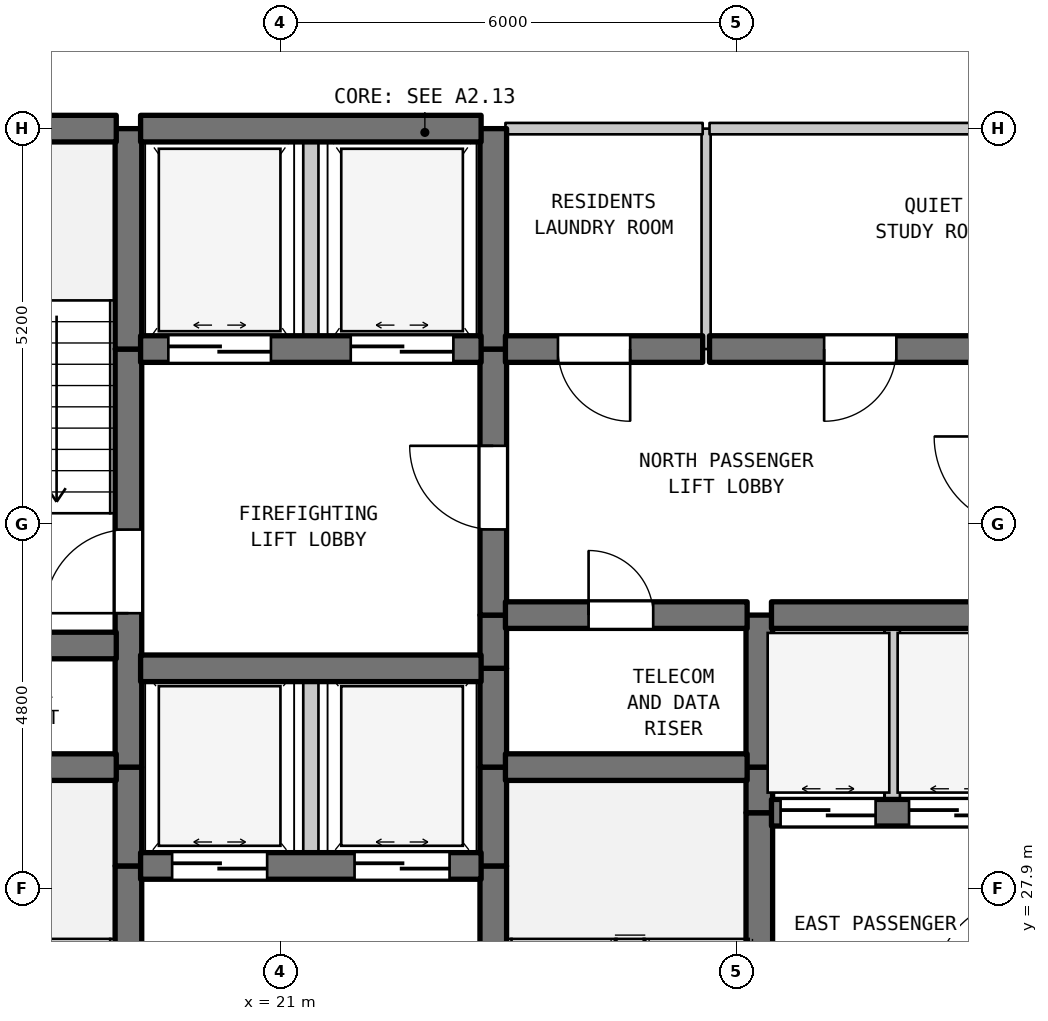
"""IFC4 building model, lengths in metres.
Left out: names, types, materials, properties, quantities, classifications, styles, units other than length and angle.
Written with IfcOpenShell. Run it as: python <this file> out.ifc"""

import sys

from ifc_helpers import new_model, si_unit, direction, frame, frame_2d, origin, place, context, subcontext, project, spatial, rectangle, extrude, element, fill, save


model = new_model("IFC4")
c1 = context("Model", 3, precision=1e-05, world=origin(), true_north=direction((0.0, 1.0)))
c2 = subcontext(c1, "Body", "Model", "MODEL_VIEW")
j1 = project(units=[si_unit("LENGTHUNIT", "METRE"), si_unit("PLANEANGLEUNIT", "RADIAN")], contexts=[c1])
p1 = place(None, origin())
s1 = spatial("IfcSite", under=j1, at=p1, CompositionType="ELEMENT")
p2 = place(p1, origin())
s2 = spatial("IfcBuilding", under=s1, at=p2, CompositionType="ELEMENT")
p3 = place(p2, frame((0.0, 0.0, 129.8)))
s3 = spatial("IfcBuildingStorey", under=s2, at=p3, CompositionType="ELEMENT", Elevation=129.8)
p4 = place(p3, frame((19.0, 22.7, 0.0), z_axis=(0.0, 0.0, 1.0), x_axis=(0.0, 1.0, 0.0)))
e1 = element("IfcWall", 1, at=p4, inside=s3, PredefinedType="SHEAR", context=c2, shape_type="SweptSolid", body=[
    extrude(rectangle(XDim=5.5, YDim=0.35, at=frame_2d((2.75, 0.0))), origin(), (0.0, 0.0, 1.0), 3.385),
])
p5 = place(p4, frame((0.631, 0.0, 0.0)))
e2 = element("IfcOpeningElement", 2, at=p5, cuts=e1, PredefinedType="OPENING", context=c2, shape_type="SweptSolid", body=[
    extrude(rectangle(XDim=1.1, YDim=2.15, at=frame_2d((0.55, 1.075))), frame((0.0, 0.185, 0.0), z_axis=(0.0, -1.0, 0.0), x_axis=(1.0, 0.0, 0.0)), (0.0, 0.0, 1.0), 0.37),
])
p6 = place(p3, frame((19.0, 28.2, 0.0), z_axis=(0.0, 0.0, 1.0), x_axis=(0.0, 1.0, 0.0)))
e3 = element("IfcWall", 3, at=p6, inside=s3, PredefinedType="SHEAR", context=c2, shape_type="SweptSolid", body=[
    extrude(rectangle(XDim=1.3, YDim=0.35, at=frame_2d((0.65, 0.0))), origin(), (0.0, 0.0, 1.0), 3.385),
])
p7 = place(p3, frame((19.0, 29.5, 0.0), z_axis=(0.0, 0.0, 1.0), x_axis=(0.0, 1.0, 0.0)))
e4 = element("IfcWall", 4, at=p7, inside=s3, PredefinedType="SHEAR", context=c2, shape_type="SweptSolid", body=[
    extrude(rectangle(XDim=5.5, YDim=0.35, at=frame_2d((2.75, 0.0))), origin(), (0.0, 0.0, 1.0), 3.385),
])
p8 = place(p7, frame((2.025, 0.0, 0.0)))
e5 = element("IfcOpeningElement", 5, at=p8, cuts=e4, PredefinedType="OPENING", context=c2, shape_type="SweptSolid", body=[
    extrude(rectangle(XDim=1.1, YDim=2.15, at=frame_2d((0.55, 1.075))), frame((0.0, 0.185, 0.0), z_axis=(0.0, -1.0, 0.0), x_axis=(1.0, 0.0, 0.0)), (0.0, 0.0, 1.0), 0.37),
])
p9 = place(p3, frame((19.0, 35.0, 0.0), z_axis=(0.0, 0.0, 1.0), x_axis=(0.0, 1.0, 0.0)))
e6 = element("IfcWall", 6, at=p9, inside=s3, PredefinedType="SHEAR", context=c2, shape_type="SweptSolid", body=[
    extrude(rectangle(XDim=2.9, YDim=0.35, at=frame_2d((1.45, 0.0))), origin(), (0.0, 0.0, 1.0), 3.385),
])
p10 = place(p3, frame((21.4, 28.2, 0.0), z_axis=(0.0, 0.0, 1.0), x_axis=(0.0, 1.0, 0.0)))
e7 = element("IfcWall", 7, at=p10, inside=s3, PredefinedType="STANDARD", context=c2, shape_type="SweptSolid", body=[
    extrude(rectangle(XDim=2.6, YDim=0.2, at=frame_2d((1.3, 0.0))), origin(), (0.0, 0.0, 1.0), 3.385),
])
p11 = place(p3, frame((21.4, 35.0, 0.0), z_axis=(0.0, 0.0, 1.0), x_axis=(0.0, 1.0, 0.0)))
e8 = element("IfcWall", 8, at=p11, inside=s3, PredefinedType="STANDARD", context=c2, shape_type="SweptSolid", body=[
    extrude(rectangle(XDim=2.9, YDim=0.2, at=frame_2d((1.45, 0.0))), origin(), (0.0, 0.0, 1.0), 3.385),
])
p12 = place(p3, frame((23.8, 22.7, 0.0), z_axis=(0.0, 0.0, 1.0), x_axis=(0.0, 1.0, 0.0)))
e9 = element("IfcWall", 9, at=p12, inside=s3, PredefinedType="SHEAR", context=c2, shape_type="SweptSolid", body=[
    extrude(rectangle(XDim=5.5, YDim=0.35, at=frame_2d((2.75, 0.0))), origin(), (0.0, 0.0, 1.0), 3.385),
])
p13 = place(p12, frame((0.235, 0.0, 0.0)))
e10 = element("IfcOpeningElement", 10, at=p13, cuts=e9, PredefinedType="OPENING", context=c2, shape_type="SweptSolid", body=[
    extrude(rectangle(XDim=1.1, YDim=2.15, at=frame_2d((0.55, 1.075))), frame((0.0, 0.185, 0.0), z_axis=(0.0, -1.0, 0.0), x_axis=(1.0, 0.0, 0.0)), (0.0, 0.0, 1.0), 0.37),
])
for number, where, z_axis, x_axis in (
    (11, (23.8, 28.2, 0.0), (0.0, 0.0, 1.0), (0.0, 1.0, 0.0)),
    (12, (23.8, 29.5, 0.0), (0.0, 0.0, 1.0), (0.0, 1.0, 0.0)),
):
    element("IfcWall", number, at=place(p3, frame(where, z_axis=z_axis, x_axis=x_axis)), inside=s3, PredefinedType="SHEAR", context=c2, shape_type="SweptSolid", body=[
        extrude(rectangle(XDim=1.3, YDim=0.35, at=frame_2d((0.65, 0.0))), origin(), (0.0, 0.0, 1.0), 3.385),
    ])
p14 = place(p3, frame((23.8, 30.8, 0.0), z_axis=(0.0, 0.0, 1.0), x_axis=(0.0, 1.0, 0.0)))
e13 = element("IfcWall", 13, at=p14, inside=s3, PredefinedType="SHEAR", context=c2, shape_type="SweptSolid", body=[
    extrude(rectangle(XDim=0.7, YDim=0.35, at=frame_2d((0.35, 0.0))), origin(), (0.0, 0.0, 1.0), 3.385),
])
p15 = place(p3, frame((23.8, 31.5, 0.0), z_axis=(0.0, 0.0, 1.0), x_axis=(0.0, 1.0, 0.0)))
e14 = element("IfcWall", 14, at=p15, inside=s3, PredefinedType="SHEAR", context=c2, shape_type="SweptSolid", body=[
    extrude(rectangle(XDim=3.5, YDim=0.35, at=frame_2d((1.75, 0.0))), origin(), (0.0, 0.0, 1.0), 3.385),
])
p16 = place(p15, frame((1.127, 0.0, 0.0)))
e15 = element("IfcOpeningElement", 15, at=p16, cuts=e14, PredefinedType="OPENING", context=c2, shape_type="SweptSolid", body=[
    extrude(rectangle(XDim=1.1, YDim=2.15, at=frame_2d((0.55, 1.075))), frame((0.0, 0.185, 0.0), z_axis=(0.0, -1.0, 0.0), x_axis=(1.0, 0.0, 0.0)), (0.0, 0.0, 1.0), 0.37),
])
p17 = place(p3, frame((23.8, 35.0, 0.0), z_axis=(0.0, 0.0, 1.0), x_axis=(0.0, 1.0, 0.0)))
e16 = element("IfcWall", 16, at=p17, inside=s3, PredefinedType="SHEAR", context=c2, shape_type="SweptSolid", body=[
    extrude(rectangle(XDim=2.9, YDim=0.35, at=frame_2d((1.45, 0.0))), origin(), (0.0, 0.0, 1.0), 3.385),
])
p18 = place(p3, frame((26.6, 35.0, 0.0), z_axis=(0.0, 0.0, 1.0), x_axis=(0.0, 1.0, 0.0)))
e17 = element("IfcWall", 17, at=p18, inside=s3, PredefinedType="PARTITIONING", context=c2, shape_type="SweptSolid", body=[
    extrude(rectangle(XDim=2.9, YDim=0.12, at=frame_2d((1.45, 0.0))), origin(), (0.0, 0.0, 1.0), 3.385),
])
p19 = place(p3, frame((27.3, 25.6, 0.0), z_axis=(0.0, 0.0, 1.0), x_axis=(0.0, 1.0, 0.0)))
e18 = element("IfcWall", 18, at=p19, inside=s3, PredefinedType="SHEAR", context=c2, shape_type="SweptSolid", body=[
    extrude(rectangle(XDim=3.3, YDim=0.35, at=frame_2d((1.65, 0.0))), origin(), (0.0, 0.0, 1.0), 3.385),
])
p20 = place(p3, frame((27.3, 28.9, 0.0), z_axis=(0.0, 0.0, 1.0), x_axis=(0.0, 1.0, 0.0)))
e19 = element("IfcWall", 19, at=p20, inside=s3, PredefinedType="SHEAR", context=c2, shape_type="SweptSolid", body=[
    extrude(rectangle(XDim=0.6, YDim=0.35, at=frame_2d((0.3, 0.0))), origin(), (0.0, 0.0, 1.0), 3.385),
])
p21 = place(p3, frame((27.3, 29.5, 0.0), z_axis=(0.0, 0.0, 1.0), x_axis=(0.0, 1.0, 0.0)))
e20 = element("IfcWall", 20, at=p21, inside=s3, PredefinedType="SHEAR", context=c2, shape_type="SweptSolid", body=[
    extrude(rectangle(XDim=2.0, YDim=0.35, at=frame_2d((1.0, 0.0))), origin(), (0.0, 0.0, 1.0), 3.385),
])
p22 = place(p3, frame((29.05, 28.9, 0.0), z_axis=(0.0, 0.0, 1.0), x_axis=(0.0, 1.0, 0.0)))
e21 = element("IfcWall", 21, at=p22, inside=s3, PredefinedType="STANDARD", context=c2, shape_type="SweptSolid", body=[
    extrude(rectangle(XDim=2.6, YDim=0.2, at=frame_2d((1.3, 0.0))), origin(), (0.0, 0.0, 1.0), 3.385),
])
p23 = place(p3, frame((19.16, 28.2, 0.0), z_axis=(0.0, 0.0, 1.0), x_axis=(1.0, 0.0, 0.0)))
e22 = element("IfcWall", 22, at=p23, inside=s3, PredefinedType="SHEAR", context=c2, shape_type="SweptSolid", body=[
    extrude(rectangle(XDim=4.48, YDim=0.35, at=frame_2d((2.24, 0.0))), origin(), (0.0, 0.0, 1.0), 3.385),
])
p24 = place(p23, frame((0.415, 0.0, 0.0)))
e23 = element("IfcOpeningElement", 23, at=p24, cuts=e22, PredefinedType="OPENING", context=c2, shape_type="SweptSolid", body=[
    extrude(rectangle(XDim=1.25, YDim=2.2, at=frame_2d((0.625, 1.1))), frame((0.0, 0.185, 0.0), z_axis=(0.0, -1.0, 0.0), x_axis=(1.0, 0.0, 0.0)), (0.0, 0.0, 1.0), 0.37),
])
p25 = place(p23, frame((2.815, 0.0, 0.0)))
e24 = element("IfcOpeningElement", 24, at=p25, cuts=e22, PredefinedType="OPENING", context=c2, shape_type="SweptSolid", body=[
    extrude(rectangle(XDim=1.25, YDim=2.2, at=frame_2d((0.625, 1.1))), frame((0.0, 0.185, 0.0), z_axis=(0.0, -1.0, 0.0), x_axis=(1.0, 0.0, 0.0)), (0.0, 0.0, 1.0), 0.37),
])
p26 = place(p3, frame((27.46, 28.9, 0.0), z_axis=(0.0, 0.0, 1.0), x_axis=(1.0, 0.0, 0.0)))
e25 = element("IfcWall", 25, at=p26, inside=s3, PredefinedType="SHEAR", context=c2, shape_type="SweptSolid", body=[
    extrude(rectangle(XDim=3.18, YDim=0.35, at=frame_2d((1.59, 0.0))), origin(), (0.0, 0.0, 1.0), 3.385),
])
p27 = place(p26, frame((0.12, 0.0, 0.0)))
e26 = element("IfcOpeningElement", 26, at=p27, cuts=e25, PredefinedType="OPENING", context=c2, shape_type="SweptSolid", body=[
    extrude(rectangle(XDim=1.25, YDim=2.2, at=frame_2d((0.625, 1.1))), frame((0.0, 0.185, 0.0), z_axis=(0.0, -1.0, 0.0), x_axis=(1.0, 0.0, 0.0)), (0.0, 0.0, 1.0), 0.37),
])
p28 = place(p26, frame((1.81, 0.0, 0.0)))
e27 = element("IfcOpeningElement", 27, at=p28, cuts=e25, PredefinedType="OPENING", context=c2, shape_type="SweptSolid", body=[
    extrude(rectangle(XDim=1.25, YDim=2.2, at=frame_2d((0.625, 1.1))), frame((0.0, 0.185, 0.0), z_axis=(0.0, -1.0, 0.0), x_axis=(1.0, 0.0, 0.0)), (0.0, 0.0, 1.0), 0.37),
])
p29 = place(p3, frame((15.16, 29.5, 0.0), z_axis=(0.0, 0.0, 1.0), x_axis=(1.0, 0.0, 0.0)))
e28 = element("IfcWall", 28, at=p29, inside=s3, PredefinedType="SHEAR", context=c2, shape_type="SweptSolid", body=[
    extrude(rectangle(XDim=3.68, YDim=0.35, at=frame_2d((1.84, 0.0))), origin(), (0.0, 0.0, 1.0), 3.385),
])
p30 = place(p3, frame((23.96, 29.5, 0.0), z_axis=(0.0, 0.0, 1.0), x_axis=(1.0, 0.0, 0.0)))
e29 = element("IfcWall", 29, at=p30, inside=s3, PredefinedType="SHEAR", context=c2, shape_type="SweptSolid", body=[
    extrude(rectangle(XDim=3.18, YDim=0.35, at=frame_2d((1.59, 0.0))), origin(), (0.0, 0.0, 1.0), 3.385),
])
p31 = place(p3, frame((19.16, 30.8, 0.0), z_axis=(0.0, 0.0, 1.0), x_axis=(1.0, 0.0, 0.0)))
e30 = element("IfcWall", 30, at=p31, inside=s3, PredefinedType="SHEAR", context=c2, shape_type="SweptSolid", body=[
    extrude(rectangle(XDim=4.48, YDim=0.35, at=frame_2d((2.24, 0.0))), origin(), (0.0, 0.0, 1.0), 3.385),
])
p32 = place(p3, frame((15.16, 31.1, 0.0), z_axis=(0.0, 0.0, 1.0), x_axis=(1.0, 0.0, 0.0)))
e31 = element("IfcWall", 31, at=p32, inside=s3, PredefinedType="SHEAR", context=c2, shape_type="SweptSolid", body=[
    extrude(rectangle(XDim=3.68, YDim=0.35, at=frame_2d((1.84, 0.0))), origin(), (0.0, 0.0, 1.0), 3.385),
])
p33 = place(p3, frame((23.96, 31.5, 0.0), z_axis=(0.0, 0.0, 1.0), x_axis=(1.0, 0.0, 0.0)))
e32 = element("IfcWall", 32, at=p33, inside=s3, PredefinedType="SHEAR", context=c2, shape_type="SweptSolid", body=[
    extrude(rectangle(XDim=3.18, YDim=0.35, at=frame_2d((1.59, 0.0))), origin(), (0.0, 0.0, 1.0), 3.385),
])
p34 = place(p33, frame((1.094, 0.0, 0.0)))
e33 = element("IfcOpeningElement", 33, at=p34, cuts=e32, PredefinedType="OPENING", context=c2, shape_type="SweptSolid", body=[
    extrude(rectangle(XDim=0.85, YDim=2.1, at=frame_2d((0.425, 1.05))), frame((0.0, 0.185, 0.0), z_axis=(0.0, -1.0, 0.0), x_axis=(1.0, 0.0, 0.0)), (0.0, 0.0, 1.0), 0.37),
])
p35 = place(p3, frame((27.46, 31.5, 0.0), z_axis=(0.0, 0.0, 1.0), x_axis=(1.0, 0.0, 0.0)))
e34 = element("IfcWall", 34, at=p35, inside=s3, PredefinedType="SHEAR", context=c2, shape_type="SweptSolid", body=[
    extrude(rectangle(XDim=3.18, YDim=0.35, at=frame_2d((1.59, 0.0))), origin(), (0.0, 0.0, 1.0), 3.385),
])
p36 = place(p3, frame((19.16, 35.0, 0.0), z_axis=(0.0, 0.0, 1.0), x_axis=(1.0, 0.0, 0.0)))
e35 = element("IfcWall", 35, at=p36, inside=s3, PredefinedType="SHEAR", context=c2, shape_type="SweptSolid", body=[
    extrude(rectangle(XDim=4.48, YDim=0.35, at=frame_2d((2.24, 0.0))), origin(), (0.0, 0.0, 1.0), 3.385),
])
p37 = place(p36, frame((0.365, 0.0, 0.0)))
e36 = element("IfcOpeningElement", 36, at=p37, cuts=e35, PredefinedType="OPENING", context=c2, shape_type="SweptSolid", body=[
    extrude(rectangle(XDim=1.35, YDim=2.2, at=frame_2d((0.675, 1.1))), frame((0.0, 0.185, 0.0), z_axis=(0.0, -1.0, 0.0), x_axis=(1.0, 0.0, 0.0)), (0.0, 0.0, 1.0), 0.37),
])
p38 = place(p36, frame((2.765, 0.0, 0.0)))
e37 = element("IfcOpeningElement", 37, at=p38, cuts=e35, PredefinedType="OPENING", context=c2, shape_type="SweptSolid", body=[
    extrude(rectangle(XDim=1.35, YDim=2.2, at=frame_2d((0.675, 1.1))), frame((0.0, 0.185, 0.0), z_axis=(0.0, -1.0, 0.0), x_axis=(1.0, 0.0, 0.0)), (0.0, 0.0, 1.0), 0.37),
])
p39 = place(p3, frame((23.96, 35.0, 0.0), z_axis=(0.0, 0.0, 1.0), x_axis=(1.0, 0.0, 0.0)))
e38 = element("IfcWall", 38, at=p39, inside=s3, PredefinedType="SHEAR", context=c2, shape_type="SweptSolid", body=[
    extrude(rectangle(XDim=2.595, YDim=0.35, at=frame_2d((1.297, 0.0))), origin(), (0.0, 0.0, 1.0), 3.385),
])
p40 = place(p39, frame((0.691, 0.0, 0.0)))
e39 = element("IfcOpeningElement", 39, at=p40, cuts=e38, PredefinedType="OPENING", context=c2, shape_type="SweptSolid", body=[
    extrude(rectangle(XDim=0.95, YDim=2.15, at=frame_2d((0.475, 1.075))), frame((0.0, 0.185, 0.0), z_axis=(0.0, -1.0, 0.0), x_axis=(1.0, 0.0, 0.0)), (0.0, 0.0, 1.0), 0.37),
])
p41 = place(p3, frame((26.645, 35.0, 0.0), z_axis=(0.0, 0.0, 1.0), x_axis=(1.0, 0.0, 0.0)))
e40 = element("IfcWall", 40, at=p41, inside=s3, PredefinedType="SHEAR", context=c2, shape_type="SweptSolid", body=[
    extrude(rectangle(XDim=3.995, YDim=0.35, at=frame_2d((1.998, 0.0))), origin(), (0.0, 0.0, 1.0), 3.385),
])
p42 = place(p41, frame((1.508, 0.0, 0.0)))
e41 = element("IfcOpeningElement", 41, at=p42, cuts=e40, PredefinedType="OPENING", context=c2, shape_type="SweptSolid", body=[
    extrude(rectangle(XDim=0.95, YDim=2.15, at=frame_2d((0.475, 1.075))), frame((0.0, 0.185, 0.0), z_axis=(0.0, -1.0, 0.0), x_axis=(1.0, 0.0, 0.0)), (0.0, 0.0, 1.0), 0.37),
])
p43 = place(p3, frame((15.16, 37.9, 0.0), z_axis=(0.0, 0.0, 1.0), x_axis=(1.0, 0.0, 0.0)))
e42 = element("IfcWall", 42, at=p43, inside=s3, PredefinedType="SHEAR", context=c2, shape_type="SweptSolid", body=[
    extrude(rectangle(XDim=3.68, YDim=0.35, at=frame_2d((1.84, 0.0))), origin(), (0.0, 0.0, 1.0), 3.385),
])
p44 = place(p3, frame((19.16, 37.9, 0.0), z_axis=(0.0, 0.0, 1.0), x_axis=(1.0, 0.0, 0.0)))
e43 = element("IfcWall", 43, at=p44, inside=s3, PredefinedType="SHEAR", context=c2, shape_type="SweptSolid", body=[
    extrude(rectangle(XDim=4.48, YDim=0.35, at=frame_2d((2.24, 0.0))), origin(), (0.0, 0.0, 1.0), 3.385),
])
p45 = place(p3, frame((23.96, 37.9, 0.0), z_axis=(0.0, 0.0, 1.0), x_axis=(1.0, 0.0, 0.0)))
e44 = element("IfcWall", 44, at=p45, inside=s3, PredefinedType="STANDARD", context=c2, shape_type="SweptSolid", body=[
    extrude(rectangle(XDim=2.595, YDim=0.15, at=frame_2d((1.297, 0.0))), origin(), (0.0, 0.0, 1.0), 2.885),
])
p46 = place(p3, frame((26.645, 37.9, 0.0), z_axis=(0.0, 0.0, 1.0), x_axis=(1.0, 0.0, 0.0)))
e45 = element("IfcWall", 45, at=p46, inside=s3, PredefinedType="STANDARD", context=c2, shape_type="SweptSolid", body=[
    extrude(rectangle(XDim=4.095, YDim=0.15, at=frame_2d((2.047, 0.0))), origin(), (0.0, 0.0, 1.0), 2.885),
])
p47 = place(p8, origin())
e46 = element("IfcDoor", 46, at=p47, inside=s3, OperationType="SINGLE_SWING_LEFT", PredefinedType="DOOR", context=c2, shape_type="SweptSolid", body=[
    extrude(rectangle(XDim=1.1, YDim=2.15, at=frame_2d((0.55, 1.075))), frame((0.0, 0.025, 0.0), z_axis=(0.0, -1.0, 0.0), x_axis=(1.0, 0.0, 0.0)), (0.0, 0.0, 1.0), 0.05),
])
fill(e5, e46)
p48 = place(p16, origin())
e47 = element("IfcDoor", 47, at=p48, inside=s3, OperationType="SINGLE_SWING_RIGHT", PredefinedType="DOOR", context=c2, shape_type="SweptSolid", body=[
    extrude(rectangle(XDim=1.1, YDim=2.15, at=frame_2d((0.55, 1.075))), frame((0.0, 0.025, 0.0), z_axis=(0.0, -1.0, 0.0), x_axis=(1.0, 0.0, 0.0)), (0.0, 0.0, 1.0), 0.05),
])
fill(e15, e47)
p49 = place(p24, origin())
e48 = element("IfcDoor", 48, at=p49, inside=s3, OperationType="DOUBLE_DOOR_SLIDING", PredefinedType="DOOR", context=c2, shape_type="SweptSolid", body=[
    extrude(rectangle(XDim=1.25, YDim=2.2, at=frame_2d((0.625, 1.1))), frame((0.0, 0.025, 0.0), z_axis=(0.0, -1.0, 0.0), x_axis=(1.0, 0.0, 0.0)), (0.0, 0.0, 1.0), 0.05),
])
fill(e23, e48)
p50 = place(p25, origin())
e49 = element("IfcDoor", 49, at=p50, inside=s3, OperationType="DOUBLE_DOOR_SLIDING", PredefinedType="DOOR", context=c2, shape_type="SweptSolid", body=[
    extrude(rectangle(XDim=1.25, YDim=2.2, at=frame_2d((0.625, 1.1))), frame((0.0, 0.025, 0.0), z_axis=(0.0, -1.0, 0.0), x_axis=(1.0, 0.0, 0.0)), (0.0, 0.0, 1.0), 0.05),
])
fill(e24, e49)
p51 = place(p27, origin())
e50 = element("IfcDoor", 50, at=p51, inside=s3, OperationType="DOUBLE_DOOR_SLIDING", PredefinedType="DOOR", context=c2, shape_type="SweptSolid", body=[
    extrude(rectangle(XDim=1.25, YDim=2.2, at=frame_2d((0.625, 1.1))), frame((0.0, 0.025, 0.0), z_axis=(0.0, -1.0, 0.0), x_axis=(1.0, 0.0, 0.0)), (0.0, 0.0, 1.0), 0.05),
])
fill(e26, e50)
p52 = place(p28, origin())
e51 = element("IfcDoor", 51, at=p52, inside=s3, OperationType="DOUBLE_DOOR_SLIDING", PredefinedType="DOOR", context=c2, shape_type="SweptSolid", body=[
    extrude(rectangle(XDim=1.25, YDim=2.2, at=frame_2d((0.625, 1.1))), frame((0.0, 0.025, 0.0), z_axis=(0.0, -1.0, 0.0), x_axis=(1.0, 0.0, 0.0)), (0.0, 0.0, 1.0), 0.05),
])
fill(e27, e51)
p53 = place(p34, origin())
e52 = element("IfcDoor", 52, at=p53, inside=s3, OperationType="SINGLE_SWING_LEFT", PredefinedType="DOOR", context=c2, shape_type="SweptSolid", body=[
    extrude(rectangle(XDim=0.85, YDim=2.1, at=frame_2d((0.425, 1.05))), frame((0.0, 0.025, 0.0), z_axis=(0.0, -1.0, 0.0), x_axis=(1.0, 0.0, 0.0)), (0.0, 0.0, 1.0), 0.05),
])
fill(e33, e52)
p54 = place(p37, origin())
e53 = element("IfcDoor", 53, at=p54, inside=s3, OperationType="DOUBLE_DOOR_SLIDING", PredefinedType="DOOR", context=c2, shape_type="SweptSolid", body=[
    extrude(rectangle(XDim=1.35, YDim=2.2, at=frame_2d((0.675, 1.1))), frame((0.0, 0.025, 0.0), z_axis=(0.0, -1.0, 0.0), x_axis=(1.0, 0.0, 0.0)), (0.0, 0.0, 1.0), 0.05),
])
fill(e36, e53)
p55 = place(p38, origin())
e54 = element("IfcDoor", 54, at=p55, inside=s3, OperationType="DOUBLE_DOOR_SLIDING", PredefinedType="DOOR", context=c2, shape_type="SweptSolid", body=[
    extrude(rectangle(XDim=1.35, YDim=2.2, at=frame_2d((0.675, 1.1))), frame((0.0, 0.025, 0.0), z_axis=(0.0, -1.0, 0.0), x_axis=(1.0, 0.0, 0.0)), (0.0, 0.0, 1.0), 0.05),
])
fill(e37, e54)
p56 = place(p40, frame((0.95, 0.0, 0.0), z_axis=(0.0, 0.0, 1.0), x_axis=(-1.0, 0.0, 0.0)))
e55 = element("IfcDoor", 55, at=p56, inside=s3, OperationType="SINGLE_SWING_RIGHT", PredefinedType="DOOR", context=c2, shape_type="SweptSolid", body=[
    extrude(rectangle(XDim=0.95, YDim=2.15, at=frame_2d((0.475, 1.075))), frame((0.0, 0.025, 0.0), z_axis=(0.0, -1.0, 0.0), x_axis=(1.0, 0.0, 0.0)), (0.0, 0.0, 1.0), 0.05),
])
fill(e39, e55)
p57 = place(p42, frame((0.95, 0.0, 0.0), z_axis=(0.0, 0.0, 1.0), x_axis=(-1.0, 0.0, 0.0)))
e56 = element("IfcDoor", 56, at=p57, inside=s3, OperationType="SINGLE_SWING_LEFT", PredefinedType="DOOR", context=c2, shape_type="SweptSolid", body=[
    extrude(rectangle(XDim=0.95, YDim=2.15, at=frame_2d((0.475, 1.075))), frame((0.0, 0.025, 0.0), z_axis=(0.0, -1.0, 0.0), x_axis=(1.0, 0.0, 0.0)), (0.0, 0.0, 1.0), 0.05),
])
fill(e41, e56)
save(model, sys.argv[1])
